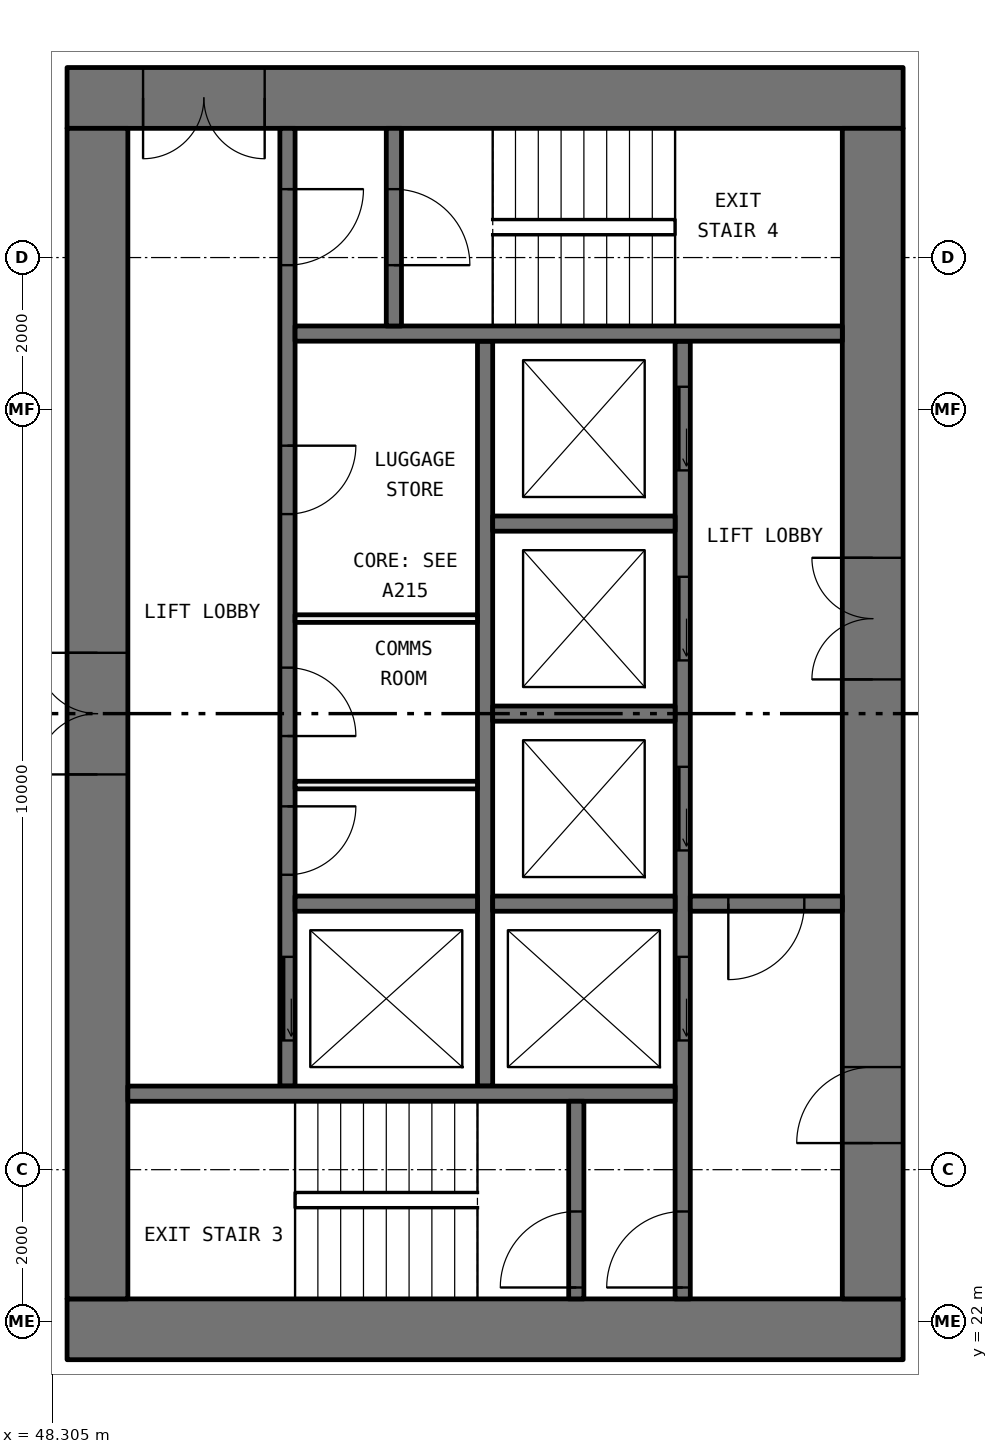
"""IFC4 building model, lengths in metres.
Left out: names, types, materials, properties, quantities, classifications, styles, units other than length and angle.
Written with IfcOpenShell. Run it as: python <this file> out.ifc"""

import sys

from ifc_helpers import new_model, si_unit, direction, frame, frame_2d, origin, place, context, subcontext, project, spatial, rectangle, extrude, element, fill, save


model = new_model("IFC4")
c1 = context("Model", 3, precision=1e-05, world=origin(), true_north=direction((0.0, 1.0)))
c2 = subcontext(c1, "Body", "Model", "MODEL_VIEW")
j1 = project(units=[si_unit("LENGTHUNIT", "METRE"), si_unit("PLANEANGLEUNIT", "RADIAN")], contexts=[c1])
p1 = place(None, origin())
s1 = spatial("IfcSite", under=j1, at=p1, CompositionType="ELEMENT")
p2 = place(p1, origin())
s2 = spatial("IfcBuilding", under=s1, at=p2, CompositionType="ELEMENT")
p3 = place(p2, frame((0.0, 0.0, 61.05)))
s3 = spatial("IfcBuildingStorey", under=s2, at=p3, CompositionType="ELEMENT", Elevation=61.05)
p4 = place(p3, frame((59.5, 21.9, 0.0), z_axis=(0.0, 0.0, 1.0), x_axis=(-1.0, 0.0, 0.0)))
e1 = element("IfcWall", 1, at=p4, inside=s3, PredefinedType="SHEAR", context=c2, shape_type="SweptSolid", body=[
    extrude(rectangle(XDim=11.0, YDim=0.8, at=frame_2d((5.5, 0.0))), origin(), (0.0, 0.0, 1.0), 3.05),
])
p5 = place(p3, frame((59.5, 38.1, 0.0), z_axis=(0.0, 0.0, 1.0), x_axis=(-1.0, 0.0, 0.0)))
e2 = element("IfcWall", 2, at=p5, inside=s3, PredefinedType="SHEAR", context=c2, shape_type="SweptSolid", body=[
    extrude(rectangle(XDim=11.0, YDim=0.8, at=frame_2d((5.5, 0.0))), origin(), (0.0, 0.0, 1.0), 3.05),
])
p6 = place(p5, frame((8.4, 0.0, 0.0)))
e3 = element("IfcOpeningElement", 3, at=p6, cuts=e2, PredefinedType="OPENING", context=c2, shape_type="SweptSolid", body=[
    extrude(rectangle(XDim=1.6, YDim=2.1, at=frame_2d((0.8, 1.05))), frame((0.0, 0.41, 0.0), z_axis=(0.0, -1.0, 0.0), x_axis=(1.0, 0.0, 0.0)), (0.0, 0.0, 1.0), 0.82),
])
p7 = place(p3, frame((59.1, 22.3, 0.0), z_axis=(0.0, 0.0, 1.0), x_axis=(0.0, 1.0, 0.0)))
e4 = element("IfcWall", 4, at=p7, inside=s3, PredefinedType="SHEAR", context=c2, shape_type="SweptSolid", body=[
    extrude(rectangle(XDim=15.4, YDim=0.8, at=frame_2d((7.7, 0.0))), origin(), (0.0, 0.0, 1.0), 3.05),
])
p8 = place(p7, frame((8.15, 0.0, 0.0)))
e5 = element("IfcOpeningElement", 5, at=p8, cuts=e4, PredefinedType="OPENING", context=c2, shape_type="SweptSolid", body=[
    extrude(rectangle(XDim=1.6, YDim=2.1, at=frame_2d((0.8, 1.05))), frame((0.0, 0.41, 0.0), z_axis=(0.0, -1.0, 0.0), x_axis=(1.0, 0.0, 0.0)), (0.0, 0.0, 1.0), 0.82),
])
p9 = place(p7, frame((2.05, 0.0, 0.0)))
e6 = element("IfcOpeningElement", 6, at=p9, cuts=e4, PredefinedType="OPENING", context=c2, shape_type="SweptSolid", body=[
    extrude(rectangle(XDim=1.0, YDim=2.1, at=frame_2d((0.5, 1.05))), frame((0.0, 0.41, 0.0), z_axis=(0.0, -1.0, 0.0), x_axis=(1.0, 0.0, 0.0)), (0.0, 0.0, 1.0), 0.82),
])
p10 = place(p3, frame((48.9, 22.3, 0.0), z_axis=(0.0, 0.0, 1.0), x_axis=(0.0, 1.0, 0.0)))
e7 = element("IfcWall", 7, at=p10, inside=s3, PredefinedType="SHEAR", context=c2, shape_type="SweptSolid", body=[
    extrude(rectangle(XDim=15.4, YDim=0.8, at=frame_2d((7.7, 0.0))), origin(), (0.0, 0.0, 1.0), 3.05),
])
p11 = place(p10, frame((6.9, 0.0, 0.0)))
e8 = element("IfcOpeningElement", 8, at=p11, cuts=e7, PredefinedType="OPENING", context=c2, shape_type="SweptSolid", body=[
    extrude(rectangle(XDim=1.6, YDim=2.1, at=frame_2d((0.8, 1.05))), frame((0.0, 0.41, 0.0), z_axis=(0.0, -1.0, 0.0), x_axis=(1.0, 0.0, 0.0)), (0.0, 0.0, 1.0), 0.82),
])
p12 = place(p3, frame((56.6, 22.3, 0.0), z_axis=(0.0, 0.0, 1.0), x_axis=(0.0, 1.0, 0.0)))
e9 = element("IfcWall", 9, at=p12, inside=s3, PredefinedType="SOLIDWALL", context=c2, shape_type="SweptSolid", body=[
    extrude(rectangle(XDim=12.6, YDim=0.2, at=frame_2d((6.3, 0.0))), origin(), (0.0, 0.0, 1.0), 3.05),
])
p13 = place(p12, frame((3.4, 0.0, 0.0)))
e10 = element("IfcOpeningElement", 10, at=p13, cuts=e9, PredefinedType="OPENING", context=c2, shape_type="SweptSolid", body=[
    extrude(rectangle(XDim=1.1, YDim=2.1, at=frame_2d((0.55, 1.05))), frame((0.0, 0.11, 0.0), z_axis=(0.0, -1.0, 0.0), x_axis=(1.0, 0.0, 0.0)), (0.0, 0.0, 1.0), 0.22),
])
p14 = place(p12, frame((5.9, 0.0, 0.0)))
e11 = element("IfcOpeningElement", 11, at=p14, cuts=e9, PredefinedType="OPENING", context=c2, shape_type="SweptSolid", body=[
    extrude(rectangle(XDim=1.1, YDim=2.1, at=frame_2d((0.55, 1.05))), frame((0.0, 0.11, 0.0), z_axis=(0.0, -1.0, 0.0), x_axis=(1.0, 0.0, 0.0)), (0.0, 0.0, 1.0), 0.22),
])
p15 = place(p12, frame((8.4, 0.0, 0.0)))
e12 = element("IfcOpeningElement", 12, at=p15, cuts=e9, PredefinedType="OPENING", context=c2, shape_type="SweptSolid", body=[
    extrude(rectangle(XDim=1.1, YDim=2.1, at=frame_2d((0.55, 1.05))), frame((0.0, 0.11, 0.0), z_axis=(0.0, -1.0, 0.0), x_axis=(1.0, 0.0, 0.0)), (0.0, 0.0, 1.0), 0.22),
])
p16 = place(p12, frame((10.9, 0.0, 0.0)))
e13 = element("IfcOpeningElement", 13, at=p16, cuts=e9, PredefinedType="OPENING", context=c2, shape_type="SweptSolid", body=[
    extrude(rectangle(XDim=1.1, YDim=2.1, at=frame_2d((0.55, 1.05))), frame((0.0, 0.11, 0.0), z_axis=(0.0, -1.0, 0.0), x_axis=(1.0, 0.0, 0.0)), (0.0, 0.0, 1.0), 0.22),
])
p17 = place(p12, frame((0.15, 0.0, 0.0)))
e14 = element("IfcOpeningElement", 14, at=p17, cuts=e9, PredefinedType="OPENING", context=c2, shape_type="SweptSolid", body=[
    extrude(rectangle(XDim=1.0, YDim=2.1, at=frame_2d((0.5, 1.05))), frame((0.0, 0.11, 0.0), z_axis=(0.0, -1.0, 0.0), x_axis=(1.0, 0.0, 0.0)), (0.0, 0.0, 1.0), 0.22),
])
p18 = place(p3, frame((51.4, 25.1, 0.0), z_axis=(0.0, 0.0, 1.0), x_axis=(0.0, 1.0, 0.0)))
e15 = element("IfcWall", 15, at=p18, inside=s3, PredefinedType="SOLIDWALL", context=c2, shape_type="SweptSolid", body=[
    extrude(rectangle(XDim=12.6, YDim=0.2, at=frame_2d((6.3, 0.0))), origin(), (0.0, 0.0, 1.0), 3.05),
])
p19 = place(p18, frame((0.6, 0.0, 0.0)))
e16 = element("IfcOpeningElement", 16, at=p19, cuts=e15, PredefinedType="OPENING", context=c2, shape_type="SweptSolid", body=[
    extrude(rectangle(XDim=1.1, YDim=2.1, at=frame_2d((0.55, 1.05))), frame((0.0, 0.11, 0.0), z_axis=(0.0, -1.0, 0.0), x_axis=(1.0, 0.0, 0.0)), (0.0, 0.0, 1.0), 0.22),
])
p20 = place(p18, frame((10.8, 0.0, 0.0)))
e17 = element("IfcOpeningElement", 17, at=p20, cuts=e15, PredefinedType="OPENING", context=c2, shape_type="SweptSolid", body=[
    extrude(rectangle(XDim=1.0, YDim=2.1, at=frame_2d((0.5, 1.05))), frame((0.0, 0.11, 0.0), z_axis=(0.0, -1.0, 0.0), x_axis=(1.0, 0.0, 0.0)), (0.0, 0.0, 1.0), 0.22),
])
p21 = place(p18, frame((2.78, 0.0, 0.0)))
e18 = element("IfcOpeningElement", 18, at=p21, cuts=e15, PredefinedType="OPENING", context=c2, shape_type="SweptSolid", body=[
    extrude(rectangle(XDim=0.9, YDim=2.1, at=frame_2d((0.45, 1.05))), frame((0.0, 0.11, 0.0), z_axis=(0.0, -1.0, 0.0), x_axis=(1.0, 0.0, 0.0)), (0.0, 0.0, 1.0), 0.22),
])
p22 = place(p18, frame((4.605, 0.0, 0.0)))
e19 = element("IfcOpeningElement", 19, at=p22, cuts=e15, PredefinedType="OPENING", context=c2, shape_type="SweptSolid", body=[
    extrude(rectangle(XDim=0.9, YDim=2.1, at=frame_2d((0.45, 1.05))), frame((0.0, 0.11, 0.0), z_axis=(0.0, -1.0, 0.0), x_axis=(1.0, 0.0, 0.0)), (0.0, 0.0, 1.0), 0.22),
])
p23 = place(p18, frame((7.525, 0.0, 0.0)))
e20 = element("IfcOpeningElement", 20, at=p23, cuts=e15, PredefinedType="OPENING", context=c2, shape_type="SweptSolid", body=[
    extrude(rectangle(XDim=0.9, YDim=2.1, at=frame_2d((0.45, 1.05))), frame((0.0, 0.11, 0.0), z_axis=(0.0, -1.0, 0.0), x_axis=(1.0, 0.0, 0.0)), (0.0, 0.0, 1.0), 0.22),
])
p24 = place(p3, frame((54.0, 25.1, 0.0), z_axis=(0.0, 0.0, 1.0), x_axis=(0.0, 1.0, 0.0)))
e21 = element("IfcWall", 21, at=p24, inside=s3, PredefinedType="SOLIDWALL", context=c2, shape_type="SweptSolid", body=[
    extrude(rectangle(XDim=9.8, YDim=0.2, at=frame_2d((4.9, 0.0))), origin(), (0.0, 0.0, 1.0), 3.05),
])
for number, where, z_axis, x_axis in (
    (22, (56.5, 25.0, 0.0), (0.0, 0.0, 1.0), (-1.0, 0.0, 0.0)),
    (23, (58.7, 35.0, 0.0), (0.0, 0.0, 1.0), (-1.0, 0.0, 0.0)),
):
    element("IfcWall", number, at=place(p3, frame(where, z_axis=z_axis, x_axis=x_axis)), inside=s3, PredefinedType="SOLIDWALL", context=c2, shape_type="SweptSolid", body=[
        extrude(rectangle(XDim=7.2, YDim=0.2, at=frame_2d((3.6, 0.0))), origin(), (0.0, 0.0, 1.0), 3.05),
    ])
p25 = place(p3, frame((58.7, 27.5, 0.0), z_axis=(0.0, 0.0, 1.0), x_axis=(-1.0, 0.0, 0.0)))
e24 = element("IfcWall", 24, at=p25, inside=s3, PredefinedType="SOLIDWALL", context=c2, shape_type="SweptSolid", body=[
    extrude(rectangle(XDim=2.0, YDim=0.2, at=frame_2d((1.0, 0.0))), origin(), (0.0, 0.0, 1.0), 3.05),
])
p26 = place(p25, frame((0.5, 0.0, 0.0)))
e25 = element("IfcOpeningElement", 25, at=p26, cuts=e24, PredefinedType="OPENING", context=c2, shape_type="SweptSolid", body=[
    extrude(rectangle(XDim=1.0, YDim=2.1, at=frame_2d((0.5, 1.05))), frame((0.0, 0.11, 0.0), z_axis=(0.0, -1.0, 0.0), x_axis=(1.0, 0.0, 0.0)), (0.0, 0.0, 1.0), 0.22),
])
p27 = place(p3, frame((55.2, 22.3, 0.0), z_axis=(0.0, 0.0, 1.0), x_axis=(0.0, 1.0, 0.0)))
e26 = element("IfcWall", 26, at=p27, inside=s3, PredefinedType="SOLIDWALL", context=c2, shape_type="SweptSolid", body=[
    extrude(rectangle(XDim=2.6, YDim=0.2, at=frame_2d((1.3, 0.0))), origin(), (0.0, 0.0, 1.0), 3.05),
])
p28 = place(p27, frame((0.15, 0.0, 0.0)))
e27 = element("IfcOpeningElement", 27, at=p28, cuts=e26, PredefinedType="OPENING", context=c2, shape_type="SweptSolid", body=[
    extrude(rectangle(XDim=1.0, YDim=2.1, at=frame_2d((0.5, 1.05))), frame((0.0, 0.11, 0.0), z_axis=(0.0, -1.0, 0.0), x_axis=(1.0, 0.0, 0.0)), (0.0, 0.0, 1.0), 0.22),
])
p29 = place(p3, frame((52.8, 35.1, 0.0), z_axis=(0.0, 0.0, 1.0), x_axis=(0.0, 1.0, 0.0)))
e28 = element("IfcWall", 28, at=p29, inside=s3, PredefinedType="SOLIDWALL", context=c2, shape_type="SweptSolid", body=[
    extrude(rectangle(XDim=2.6, YDim=0.2, at=frame_2d((1.3, 0.0))), origin(), (0.0, 0.0, 1.0), 3.05),
])
p30 = place(p29, frame((0.8, 0.0, 0.0)))
e29 = element("IfcOpeningElement", 29, at=p30, cuts=e28, PredefinedType="OPENING", context=c2, shape_type="SweptSolid", body=[
    extrude(rectangle(XDim=1.0, YDim=2.1, at=frame_2d((0.5, 1.05))), frame((0.0, 0.11, 0.0), z_axis=(0.0, -1.0, 0.0), x_axis=(1.0, 0.0, 0.0)), (0.0, 0.0, 1.0), 0.22),
])
for number, where, z_axis, x_axis in (
    (30, (56.5, 27.5, 0.0), (0.0, 0.0, 1.0), (-1.0, 0.0, 0.0)),
    (31, (56.5, 30.0, 0.0), (0.0, 0.0, 1.0), (-1.0, 0.0, 0.0)),
    (32, (56.5, 32.5, 0.0), (0.0, 0.0, 1.0), (-1.0, 0.0, 0.0)),
    (33, (53.9, 27.5, 0.0), (0.0, 0.0, 1.0), (-1.0, 0.0, 0.0)),
):
    element("IfcWall", number, at=place(p3, frame(where, z_axis=z_axis, x_axis=x_axis)), inside=s3, PredefinedType="SOLIDWALL", context=c2, shape_type="SweptSolid", body=[
        extrude(rectangle(XDim=2.4, YDim=0.2, at=frame_2d((1.2, 0.0))), origin(), (0.0, 0.0, 1.0), 3.05),
    ])
for number, where, z_axis, x_axis in (
    (34, (53.9, 29.06, 0.0), (0.0, 0.0, 1.0), (-1.0, 0.0, 0.0)),
    (35, (53.9, 31.25, 0.0), (0.0, 0.0, 1.0), (-1.0, 0.0, 0.0)),
):
    element("IfcWall", number, at=place(p3, frame(where, z_axis=z_axis, x_axis=x_axis)), inside=s3, PredefinedType="PARTITIONING", context=c2, shape_type="SweptSolid", body=[
        extrude(rectangle(XDim=2.4, YDim=0.1, at=frame_2d((1.2, 0.0))), origin(), (0.0, 0.0, 1.0), 3.05),
    ])
p31 = place(p19, origin())
e36 = element("IfcDoor", 36, at=p31, inside=s3, OperationType="SLIDING_TO_LEFT", PredefinedType="DOOR", context=c2, shape_type="SweptSolid", body=[
    extrude(rectangle(XDim=1.1, YDim=2.1, at=frame_2d((0.55, 1.05))), frame((0.0, 0.025, 0.0), z_axis=(0.0, -1.0, 0.0), x_axis=(1.0, 0.0, 0.0)), (0.0, 0.0, 1.0), 0.05),
])
fill(e16, e36)
p32 = place(p13, origin())
e37 = element("IfcDoor", 37, at=p32, inside=s3, OperationType="SLIDING_TO_LEFT", PredefinedType="DOOR", context=c2, shape_type="SweptSolid", body=[
    extrude(rectangle(XDim=1.1, YDim=2.1, at=frame_2d((0.55, 1.05))), frame((0.0, 0.025, 0.0), z_axis=(0.0, -1.0, 0.0), x_axis=(1.0, 0.0, 0.0)), (0.0, 0.0, 1.0), 0.05),
])
fill(e10, e37)
p33 = place(p14, origin())
e38 = element("IfcDoor", 38, at=p33, inside=s3, OperationType="SLIDING_TO_LEFT", PredefinedType="DOOR", context=c2, shape_type="SweptSolid", body=[
    extrude(rectangle(XDim=1.1, YDim=2.1, at=frame_2d((0.55, 1.05))), frame((0.0, 0.025, 0.0), z_axis=(0.0, -1.0, 0.0), x_axis=(1.0, 0.0, 0.0)), (0.0, 0.0, 1.0), 0.05),
])
fill(e11, e38)
p34 = place(p15, origin())
e39 = element("IfcDoor", 39, at=p34, inside=s3, OperationType="SLIDING_TO_LEFT", PredefinedType="DOOR", context=c2, shape_type="SweptSolid", body=[
    extrude(rectangle(XDim=1.1, YDim=2.1, at=frame_2d((0.55, 1.05))), frame((0.0, 0.025, 0.0), z_axis=(0.0, -1.0, 0.0), x_axis=(1.0, 0.0, 0.0)), (0.0, 0.0, 1.0), 0.05),
])
fill(e12, e39)
p35 = place(p16, origin())
e40 = element("IfcDoor", 40, at=p35, inside=s3, OperationType="SLIDING_TO_LEFT", PredefinedType="DOOR", context=c2, shape_type="SweptSolid", body=[
    extrude(rectangle(XDim=1.1, YDim=2.1, at=frame_2d((0.55, 1.05))), frame((0.0, 0.025, 0.0), z_axis=(0.0, -1.0, 0.0), x_axis=(1.0, 0.0, 0.0)), (0.0, 0.0, 1.0), 0.05),
])
fill(e13, e40)
p36 = place(p28, origin())
e41 = element("IfcDoor", 41, at=p36, inside=s3, OperationType="SINGLE_SWING_RIGHT", PredefinedType="DOOR", context=c2, shape_type="SweptSolid", body=[
    extrude(rectangle(XDim=1.0, YDim=2.1, at=frame_2d((0.5, 1.05))), frame((0.0, 0.025, 0.0), z_axis=(0.0, -1.0, 0.0), x_axis=(1.0, 0.0, 0.0)), (0.0, 0.0, 1.0), 0.05),
])
fill(e27, e41)
p37 = place(p17, origin())
e42 = element("IfcDoor", 42, at=p37, inside=s3, OperationType="SINGLE_SWING_RIGHT", PredefinedType="DOOR", context=c2, shape_type="SweptSolid", body=[
    extrude(rectangle(XDim=1.0, YDim=2.1, at=frame_2d((0.5, 1.05))), frame((0.0, 0.025, 0.0), z_axis=(0.0, -1.0, 0.0), x_axis=(1.0, 0.0, 0.0)), (0.0, 0.0, 1.0), 0.05),
])
fill(e14, e42)
p38 = place(p20, frame((1.0, 0.0, 0.0), x_axis=(-1.0, 0.0, 0.0)))
e43 = element("IfcDoor", 43, at=p38, inside=s3, OperationType="SINGLE_SWING_RIGHT", PredefinedType="DOOR", context=c2, shape_type="SweptSolid", body=[
    extrude(rectangle(XDim=1.0, YDim=2.1, at=frame_2d((0.5, 1.05))), frame((0.0, 0.025, 0.0), z_axis=(0.0, -1.0, 0.0), x_axis=(1.0, 0.0, 0.0)), (0.0, 0.0, 1.0), 0.05),
])
fill(e17, e43)
p39 = place(p30, frame((1.0, 0.0, 0.0), x_axis=(-1.0, 0.0, 0.0)))
e44 = element("IfcDoor", 44, at=p39, inside=s3, OperationType="SINGLE_SWING_LEFT", PredefinedType="DOOR", context=c2, shape_type="SweptSolid", body=[
    extrude(rectangle(XDim=1.0, YDim=2.1, at=frame_2d((0.5, 1.05))), frame((0.0, 0.025, 0.0), z_axis=(0.0, -1.0, 0.0), x_axis=(1.0, 0.0, 0.0)), (0.0, 0.0, 1.0), 0.05),
])
fill(e29, e44)
p40 = place(p26, origin())
e45 = element("IfcDoor", 45, at=p40, inside=s3, OperationType="SINGLE_SWING_LEFT", PredefinedType="DOOR", context=c2, shape_type="SweptSolid", body=[
    extrude(rectangle(XDim=1.0, YDim=2.1, at=frame_2d((0.5, 1.05))), frame((0.0, 0.025, 0.0), z_axis=(0.0, -1.0, 0.0), x_axis=(1.0, 0.0, 0.0)), (0.0, 0.0, 1.0), 0.05),
])
fill(e25, e45)
p41 = place(p8, origin())
e46 = element("IfcDoor", 46, at=p41, inside=s3, OperationType="DOUBLE_DOOR_SINGLE_SWING", PredefinedType="DOOR", context=c2, shape_type="SweptSolid", body=[
    extrude(rectangle(XDim=1.6, YDim=2.1, at=frame_2d((0.8, 1.05))), frame((0.0, 0.025, 0.0), z_axis=(0.0, -1.0, 0.0), x_axis=(1.0, 0.0, 0.0)), (0.0, 0.0, 1.0), 0.05),
])
fill(e5, e46)
p42 = place(p9, origin())
e47 = element("IfcDoor", 47, at=p42, inside=s3, OperationType="SINGLE_SWING_RIGHT", PredefinedType="DOOR", context=c2, shape_type="SweptSolid", body=[
    extrude(rectangle(XDim=1.0, YDim=2.1, at=frame_2d((0.5, 1.05))), frame((0.0, 0.025, 0.0), z_axis=(0.0, -1.0, 0.0), x_axis=(1.0, 0.0, 0.0)), (0.0, 0.0, 1.0), 0.05),
])
fill(e6, e47)
p43 = place(p6, origin())
e48 = element("IfcDoor", 48, at=p43, inside=s3, OperationType="DOUBLE_DOOR_SINGLE_SWING", PredefinedType="DOOR", context=c2, shape_type="SweptSolid", body=[
    extrude(rectangle(XDim=1.6, YDim=2.1, at=frame_2d((0.8, 1.05))), frame((0.0, 0.025, 0.0), z_axis=(0.0, -1.0, 0.0), x_axis=(1.0, 0.0, 0.0)), (0.0, 0.0, 1.0), 0.05),
])
fill(e3, e48)
p44 = place(p11, origin())
e49 = element("IfcDoor", 49, at=p44, inside=s3, OperationType="DOUBLE_DOOR_SINGLE_SWING", PredefinedType="DOOR", context=c2, shape_type="SweptSolid", body=[
    extrude(rectangle(XDim=1.6, YDim=2.1, at=frame_2d((0.8, 1.05))), frame((0.0, 0.025, 0.0), z_axis=(0.0, -1.0, 0.0), x_axis=(1.0, 0.0, 0.0)), (0.0, 0.0, 1.0), 0.05),
])
fill(e8, e49)
p45 = place(p21, frame((0.9, 0.0, 0.0), x_axis=(-1.0, 0.0, 0.0)))
e50 = element("IfcDoor", 50, at=p45, inside=s3, OperationType="SINGLE_SWING_RIGHT", PredefinedType="DOOR", context=c2, shape_type="SweptSolid", body=[
    extrude(rectangle(XDim=0.9, YDim=2.1, at=frame_2d((0.45, 1.05))), frame((0.0, 0.025, 0.0), z_axis=(0.0, -1.0, 0.0), x_axis=(1.0, 0.0, 0.0)), (0.0, 0.0, 1.0), 0.05),
])
fill(e18, e50)
p46 = place(p22, frame((0.9, 0.0, 0.0), x_axis=(-1.0, 0.0, 0.0)))
e51 = element("IfcDoor", 51, at=p46, inside=s3, OperationType="SINGLE_SWING_LEFT", PredefinedType="DOOR", context=c2, shape_type="SweptSolid", body=[
    extrude(rectangle(XDim=0.9, YDim=2.1, at=frame_2d((0.45, 1.05))), frame((0.0, 0.025, 0.0), z_axis=(0.0, -1.0, 0.0), x_axis=(1.0, 0.0, 0.0)), (0.0, 0.0, 1.0), 0.05),
])
fill(e19, e51)
p47 = place(p23, frame((0.9, 0.0, 0.0), x_axis=(-1.0, 0.0, 0.0)))
e52 = element("IfcDoor", 52, at=p47, inside=s3, OperationType="SINGLE_SWING_RIGHT", PredefinedType="DOOR", context=c2, shape_type="SweptSolid", body=[
    extrude(rectangle(XDim=0.9, YDim=2.1, at=frame_2d((0.45, 1.05))), frame((0.0, 0.025, 0.0), z_axis=(0.0, -1.0, 0.0), x_axis=(1.0, 0.0, 0.0)), (0.0, 0.0, 1.0), 0.05),
])
fill(e20, e52)
save(model, sys.argv[1])
